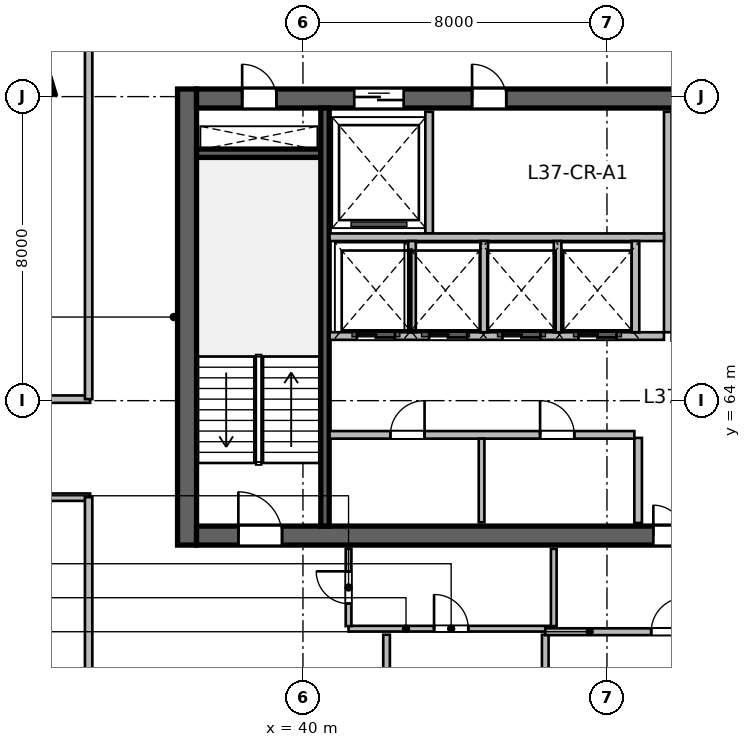
"""IFC4 building model, lengths in metres.
Left out: names, types, materials, properties, quantities, classifications, styles, units other than length and angle.
Written with IfcOpenShell. Run it as: python <this file> out.ifc"""

import sys

from ifc_helpers import new_model, si_unit, direction, frame, frame_2d, origin, origin_2d, place, context, subcontext, project, spatial, rectangle, extrude, source, transform, mapped, element, fill, save


model = new_model("IFC4")
c1 = context("Model", 3, precision=1e-05, world=origin(), true_north=direction((0.0, 1.0)))
c2 = subcontext(c1, "Body", "Model", "MODEL_VIEW")
j1 = project(units=[si_unit("LENGTHUNIT", "METRE"), si_unit("PLANEANGLEUNIT", "RADIAN")], contexts=[c1])
p1 = place(None, origin())
s1 = spatial("IfcSite", under=j1, at=p1, CompositionType="ELEMENT")
p2 = place(p1, origin())
s2 = spatial("IfcBuilding", under=s1, at=p2, CompositionType="ELEMENT")
p3 = place(p2, frame((0.0, 0.0, 154.5)))
s3 = spatial("IfcBuildingStorey", under=s2, at=p3, CompositionType="ELEMENT", Elevation=154.5)
m1 = source(origin(), c2, "Body", "SweptSolid", [
    extrude(rectangle(XDim=12.0, YDim=0.5, at=frame_2d((6.0, 0.0))), origin(), (0.0, 0.0, 1.0), 3.9),
])
p4 = place(p3, frame((36.95, 60.2, 0.0), z_axis=(0.0, 0.0, 1.0), x_axis=(0.0, 1.0, 0.0)))
e1 = element("IfcWall", 1, at=p4, inside=s3, PredefinedType="SHEAR", context=c2, shape_type="MappedRepresentation", body=[
    mapped(m1, transform((0.0, 0.0, 0.0), scale=1.0)),
])
m2 = source(origin(), c2, "Body", "SweptSolid", [
    extrude(rectangle(XDim=21.6, YDim=0.5, at=frame_2d((10.8, 0.0))), origin(), (0.0, 0.0, 1.0), 3.9),
])
p5 = place(p3, frame((37.2, 60.45, 0.0), z_axis=(0.0, 0.0, 1.0), x_axis=(1.0, 0.0, 0.0)))
e2 = element("IfcWall", 2, at=p5, inside=s3, PredefinedType="SHEAR", context=c2, shape_type="MappedRepresentation", body=[
    mapped(m2, transform((0.0, 0.0, 0.0), scale=1.0)),
])
p6 = place(p5, frame((1.1, 0.0, 0.0)))
e3 = element("IfcOpeningElement", 3, at=p6, cuts=e2, PredefinedType="OPENING", context=c2, shape_type="SweptSolid", body=[
    extrude(rectangle(XDim=1.15, YDim=2.15, at=frame_2d((0.575, 1.075))), frame((0.0, 0.26, 0.0), z_axis=(0.0, -1.0, 0.0), x_axis=(1.0, 0.0, 0.0)), (0.0, 0.0, 1.0), 0.52),
])
p7 = place(p5, frame((19.5, 0.0, 0.0)))
e4 = element("IfcOpeningElement", 4, at=p7, cuts=e2, PredefinedType="OPENING", context=c2, shape_type="SweptSolid", body=[
    extrude(rectangle(XDim=0.9, YDim=2.1, at=frame_2d((0.45, 1.05))), frame((0.0, 0.26, 0.0), z_axis=(0.0, -1.0, 0.0), x_axis=(1.0, 0.0, 0.0)), (0.0, 0.0, 1.0), 0.52),
])
p8 = place(p5, frame((12.02, 0.0, 0.0)))
e5 = element("IfcOpeningElement", 5, at=p8, cuts=e2, PredefinedType="OPENING", context=c2, shape_type="SweptSolid", body=[
    extrude(rectangle(XDim=1.6, YDim=2.15, at=frame_2d((0.8, 1.075))), frame((0.0, 0.26, 0.0), z_axis=(0.0, -1.0, 0.0), x_axis=(1.0, 0.0, 0.0)), (0.0, 0.0, 1.0), 0.52),
])
p9 = place(p3, frame((37.2, 71.95, 0.0), z_axis=(0.0, 0.0, 1.0), x_axis=(1.0, 0.0, 0.0)))
e6 = element("IfcWall", 6, at=p9, inside=s3, PredefinedType="SHEAR", context=c2, shape_type="MappedRepresentation", body=[
    mapped(m2, transform((0.0, 0.0, 0.0), scale=1.0)),
])
p10 = place(p9, frame((1.2, 0.0, 0.0)))
e7 = element("IfcOpeningElement", 7, at=p10, cuts=e6, PredefinedType="OPENING", context=c2, shape_type="SweptSolid", body=[
    extrude(rectangle(XDim=0.9, YDim=2.1, at=frame_2d((0.45, 1.05))), frame((0.0, 0.26, 0.0), z_axis=(0.0, -1.0, 0.0), x_axis=(1.0, 0.0, 0.0)), (0.0, 0.0, 1.0), 0.52),
])
p11 = place(p9, frame((14.7, 0.0, 0.0)))
e8 = element("IfcOpeningElement", 8, at=p11, cuts=e6, PredefinedType="OPENING", context=c2, shape_type="SweptSolid", body=[
    extrude(rectangle(XDim=1.2, YDim=2.15, at=frame_2d((0.6, 1.075))), frame((0.0, 0.26, 0.0), z_axis=(0.0, -1.0, 0.0), x_axis=(1.0, 0.0, 0.0)), (0.0, 0.0, 1.0), 0.52),
])
p12 = place(p9, frame((4.15, 0.0, 0.0)))
e9 = element("IfcOpeningElement", 9, at=p12, cuts=e6, PredefinedType="OPENING", context=c2, shape_type="SweptSolid", body=[
    extrude(rectangle(XDim=1.3, YDim=2.15, at=frame_2d((0.65, 1.075))), frame((0.0, 0.26, 0.0), z_axis=(0.0, -1.0, 0.0), x_axis=(1.0, 0.0, 0.0)), (0.0, 0.0, 1.0), 0.52),
])
p13 = place(p9, frame((7.25, 0.0, 0.0)))
e10 = element("IfcOpeningElement", 10, at=p13, cuts=e6, PredefinedType="OPENING", context=c2, shape_type="SweptSolid", body=[
    extrude(rectangle(XDim=0.9, YDim=2.1, at=frame_2d((0.45, 1.05))), frame((0.0, 0.26, 0.0), z_axis=(0.0, -1.0, 0.0), x_axis=(1.0, 0.0, 0.0)), (0.0, 0.0, 1.0), 0.52),
])
m3 = source(origin(), c2, "Body", "SweptSolid", [
    extrude(rectangle(XDim=3.27, YDim=0.22, at=frame_2d((1.635, 0.0))), origin(), (0.0, 0.0, 1.0), 3.9),
])
p14 = place(p3, frame((37.2, 70.51, 0.0), z_axis=(0.0, 0.0, 1.0), x_axis=(1.0, 0.0, 0.0)))
e11 = element("IfcWall", 11, at=p14, inside=s3, PredefinedType="SHEAR", context=c2, shape_type="MappedRepresentation", body=[
    mapped(m3, transform((0.0, 0.0, 0.0), scale=1.0)),
])
m4 = source(origin(), c2, "Body", "SweptSolid", [
    extrude(rectangle(XDim=11.0, YDim=0.22, at=frame_2d((5.5, 0.0))), origin(), (0.0, 0.0, 1.0), 3.9),
])
p15 = place(p3, frame((40.58, 60.7, 0.0), z_axis=(0.0, 0.0, 1.0), x_axis=(0.0, 1.0, 0.0)))
e12 = element("IfcWall", 12, at=p15, inside=s3, PredefinedType="SHEAR", context=c2, shape_type="MappedRepresentation", body=[
    mapped(m4, transform((0.0, 0.0, 0.0), scale=1.0)),
])
m5 = source(origin(), c2, "Body", "SweptSolid", [
    extrude(rectangle(XDim=1.1, YDim=1.1, at=origin_2d()), origin(), (0.0, 0.0, 1.0), 3.9),
])
p16 = place(p3, frame((32.791, 72.442, 0.0), z_axis=(0.0, 0.0, 1.0), x_axis=(-0.288697611798, 0.957420330337, 0.0)))
e13 = element("IfcColumn", 13, at=p16, inside=s3, PredefinedType="COLUMN", context=c2, shape_type="MappedRepresentation", body=[
    mapped(m5, transform((0.0, 0.0, 0.0), scale=1.0)),
])
m6 = source(origin(), c2, "Body", "SweptSolid", [
    extrude(rectangle(XDim=4.384, YDim=0.28, at=frame_2d((2.192, 0.0))), origin(), (0.0, 0.0, 1.0), 3.65),
])
p17 = place(p3, frame((31.702, 73.08, 0.0), z_axis=(0.0, 0.0, 1.0), x_axis=(0.895969968053, 0.444114643248, 0.0)))
e14 = element("IfcWall", 14, at=p17, inside=s3, PredefinedType="SOLIDWALL", context=c2, shape_type="MappedRepresentation", body=[
    mapped(m6, transform((0.0, 0.0, 0.0), scale=1.0)),
])
m7 = source(origin(), c2, "Body", "SweptSolid", [
    extrude(rectangle(XDim=2.24, YDim=0.2, at=frame_2d((1.12, 0.0))), origin(), (0.0, 0.0, 1.0), 3.65),
])
p18 = place(p3, frame((48.82, 60.78, 0.0), z_axis=(0.0, 0.0, 1.0), x_axis=(0.0, 1.0, 0.0)))
e15 = element("IfcWall", 15, at=p18, inside=s3, PredefinedType="SOLIDWALL", context=c2, shape_type="MappedRepresentation", body=[
    mapped(m7, transform((0.0, 0.0, 0.0), scale=1.0)),
])
m8 = source(origin(), c2, "Body", "SweptSolid", [
    extrude(rectangle(XDim=5.8, YDim=0.2, at=frame_2d((2.9, 0.0))), origin(), (0.0, 0.0, 1.0), 3.65),
])
p19 = place(p3, frame((49.6, 65.8, 0.0), z_axis=(0.0, 0.0, 1.0), x_axis=(0.0, 1.0, 0.0)))
e16 = element("IfcWall", 16, at=p19, inside=s3, PredefinedType="SOLIDWALL", context=c2, shape_type="MappedRepresentation", body=[
    mapped(m8, transform((0.0, 0.0, 0.0), scale=1.0)),
])
m9 = source(origin(), c2, "Body", "SweptSolid", [
    extrude(rectangle(XDim=3.2, YDim=0.2, at=frame_2d((1.6, 0.0))), origin(), (0.0, 0.0, 1.0), 3.65),
])
p20 = place(p3, frame((43.32, 68.4, 0.0), z_axis=(0.0, 0.0, 1.0), x_axis=(0.0, 1.0, 0.0)))
e17 = element("IfcWall", 17, at=p20, inside=s3, PredefinedType="SOLIDWALL", context=c2, shape_type="MappedRepresentation", body=[
    mapped(m9, transform((0.0, 0.0, 0.0), scale=1.0)),
])
m10 = source(origin(), c2, "Body", "SweptSolid", [
    extrude(rectangle(XDim=8.8, YDim=0.2, at=frame_2d((4.4, 0.0))), origin(), (0.0, 0.0, 1.0), 3.65),
])
p21 = place(p3, frame((40.7, 68.3, 0.0), z_axis=(0.0, 0.0, 1.0), x_axis=(1.0, 0.0, 0.0)))
e18 = element("IfcWall", 18, at=p21, inside=s3, PredefinedType="SOLIDWALL", context=c2, shape_type="MappedRepresentation", body=[
    mapped(m10, transform((0.0, 0.0, 0.0), scale=1.0)),
])
m11 = source(origin(), c2, "Body", "SweptSolid", [
    extrude(rectangle(XDim=8.02, YDim=0.2, at=frame_2d((4.01, 0.0))), origin(), (0.0, 0.0, 1.0), 3.65),
])
p22 = place(p3, frame((40.7, 63.1, 0.0), z_axis=(0.0, 0.0, 1.0), x_axis=(1.0, 0.0, 0.0)))
e19 = element("IfcWall", 19, at=p22, inside=s3, PredefinedType="SOLIDWALL", context=c2, shape_type="MappedRepresentation", body=[
    mapped(m11, transform((0.0, 0.0, 0.0), scale=1.0)),
])
p23 = place(p22, frame((1.6, 0.0, 0.0)))
e20 = element("IfcOpeningElement", 20, at=p23, cuts=e19, PredefinedType="OPENING", context=c2, shape_type="SweptSolid", body=[
    extrude(rectangle(XDim=0.9, YDim=2.1, at=frame_2d((0.45, 1.05))), frame((0.0, 0.11, 0.0), z_axis=(0.0, -1.0, 0.0), x_axis=(1.0, 0.0, 0.0)), (0.0, 0.0, 1.0), 0.22),
])
p24 = place(p22, frame((5.54, 0.0, 0.0)))
e21 = element("IfcOpeningElement", 21, at=p24, cuts=e19, PredefinedType="OPENING", context=c2, shape_type="SweptSolid", body=[
    extrude(rectangle(XDim=0.9, YDim=2.1, at=frame_2d((0.45, 1.05))), frame((0.0, 0.11, 0.0), z_axis=(0.0, -1.0, 0.0), x_axis=(1.0, 0.0, 0.0)), (0.0, 0.0, 1.0), 0.22),
])
m12 = source(origin(), c2, "Body", "SweptSolid", [
    extrude(rectangle(XDim=2.2, YDim=0.15, at=frame_2d((1.1, 0.0))), origin(), (0.0, 0.0, 1.0), 3.65),
])
p25 = place(p3, frame((44.7, 60.8, 0.0), z_axis=(0.0, 0.0, 1.0), x_axis=(0.0, 1.0, 0.0)))
e22 = element("IfcWall", 22, at=p25, inside=s3, PredefinedType="PARTITIONING", context=c2, shape_type="MappedRepresentation", body=[
    mapped(m12, transform((0.0, 0.0, 0.0), scale=1.0)),
])
p26 = place(p3, frame((40.7, 65.7, 0.0), z_axis=(0.0, 0.0, 1.0), x_axis=(1.0, 0.0, 0.0)))
e23 = element("IfcWall", 23, at=p26, inside=s3, PredefinedType="SOLIDWALL", context=c2, shape_type="MappedRepresentation", body=[
    mapped(m10, transform((0.0, 0.0, 0.0), scale=1.0)),
])
p27 = place(p26, frame((0.72, 0.0, 0.0)))
e24 = element("IfcOpeningElement", 24, at=p27, cuts=e23, PredefinedType="OPENING", context=c2, shape_type="SweptSolid", body=[
    extrude(rectangle(XDim=1.0, YDim=2.15, at=frame_2d((0.5, 1.075))), frame((0.0, 0.11, 0.0), z_axis=(0.0, -1.0, 0.0), x_axis=(1.0, 0.0, 0.0)), (0.0, 0.0, 1.0), 0.22),
])
p28 = place(p26, frame((2.62, 0.0, 0.0)))
e25 = element("IfcOpeningElement", 25, at=p28, cuts=e23, PredefinedType="OPENING", context=c2, shape_type="SweptSolid", body=[
    extrude(rectangle(XDim=1.0, YDim=2.15, at=frame_2d((0.5, 1.075))), frame((0.0, 0.11, 0.0), z_axis=(0.0, -1.0, 0.0), x_axis=(1.0, 0.0, 0.0)), (0.0, 0.0, 1.0), 0.22),
])
p29 = place(p26, frame((4.55, 0.0, 0.0)))
e26 = element("IfcOpeningElement", 26, at=p29, cuts=e23, PredefinedType="OPENING", context=c2, shape_type="SweptSolid", body=[
    extrude(rectangle(XDim=1.0, YDim=2.15, at=frame_2d((0.5, 1.075))), frame((0.0, 0.11, 0.0), z_axis=(0.0, -1.0, 0.0), x_axis=(1.0, 0.0, 0.0)), (0.0, 0.0, 1.0), 0.22),
])
p30 = place(p26, frame((6.55, 0.0, 0.0)))
e27 = element("IfcOpeningElement", 27, at=p30, cuts=e23, PredefinedType="OPENING", context=c2, shape_type="SweptSolid", body=[
    extrude(rectangle(XDim=1.0, YDim=2.15, at=frame_2d((0.5, 1.075))), frame((0.0, 0.11, 0.0), z_axis=(0.0, -1.0, 0.0), x_axis=(1.0, 0.0, 0.0)), (0.0, 0.0, 1.0), 0.22),
])
m13 = source(origin(), c2, "Body", "SweptSolid", [
    extrude(rectangle(XDim=2.4, YDim=0.2, at=frame_2d((1.2, 0.0))), origin(), (0.0, 0.0, 1.0), 3.65),
])
for number, where, z_axis, x_axis in (
    (28, (48.75, 65.8, 0.0), (0.0, 0.0, 1.0), (0.0, 1.0, 0.0)),
    (29, (42.87, 65.8, 0.0), (0.0, 0.0, 1.0), (0.0, 1.0, 0.0)),
    (30, (44.77, 65.8, 0.0), (0.0, 0.0, 1.0), (0.0, 1.0, 0.0)),
    (31, (46.7, 65.8, 0.0), (0.0, 0.0, 1.0), (0.0, 1.0, 0.0)),
):
    element("IfcWall", number, at=place(p3, frame(where, z_axis=z_axis, x_axis=x_axis)), inside=s3, PredefinedType="SOLIDWALL", context=c2, shape_type="MappedRepresentation", body=[
        mapped(m13, transform((0.0, 0.0, 0.0), scale=1.0)),
    ])
m14 = source(origin(), c2, "Body", "SweptSolid", [
    extrude(rectangle(XDim=5.4, YDim=0.15, at=frame_2d((2.7, 0.0))), origin(), (0.0, 0.0, 1.0), 3.65),
])
p31 = place(p3, frame((41.2, 58.0, 0.0), z_axis=(0.0, 0.0, 1.0), x_axis=(1.0, 0.0, 0.0)))
e32 = element("IfcWall", 32, at=p31, inside=s3, PredefinedType="PARTITIONING", context=c2, shape_type="MappedRepresentation", body=[
    mapped(m14, transform((0.0, 0.0, 0.0), scale=1.0)),
])
p32 = place(p31, frame((2.25, 0.0, 0.0)))
e33 = element("IfcOpeningElement", 33, at=p32, cuts=e32, PredefinedType="OPENING", context=c2, shape_type="SweptSolid", body=[
    extrude(rectangle(XDim=0.9, YDim=2.08, at=frame_2d((0.45, 1.04))), frame((0.0, 0.085, 0.0), z_axis=(0.0, -1.0, 0.0), x_axis=(1.0, 0.0, 0.0)), (0.0, 0.0, 1.0), 0.17),
])
m15 = source(origin(), c2, "Body", "SweptSolid", [
    extrude(rectangle(XDim=2.033, YDim=0.15, at=frame_2d((1.016, 0.0))), origin(), (0.0, 0.0, 1.0), 3.65),
])
p33 = place(p3, frame((41.2, 58.067, 0.0), z_axis=(0.0, 0.0, 1.0), x_axis=(0.0, 1.0, 0.0)))
e34 = element("IfcWall", 34, at=p33, inside=s3, PredefinedType="PARTITIONING", context=c2, shape_type="MappedRepresentation", body=[
    mapped(m15, transform((0.0, 0.0, 0.0), scale=1.0)),
])
p34 = place(p33, frame((0.591, 0.0, 0.0)))
e35 = element("IfcOpeningElement", 35, at=p34, cuts=e34, PredefinedType="OPENING", context=c2, shape_type="SweptSolid", body=[
    extrude(rectangle(XDim=0.85, YDim=2.1, at=frame_2d((0.425, 1.05))), frame((0.0, 0.085, 0.0), z_axis=(0.0, -1.0, 0.0), x_axis=(1.0, 0.0, 0.0)), (0.0, 0.0, 1.0), 0.17),
])
p35 = place(p3, frame((46.6, 58.067, 0.0), z_axis=(0.0, 0.0, 1.0), x_axis=(0.0, 1.0, 0.0)))
e36 = element("IfcWall", 36, at=p35, inside=s3, PredefinedType="PARTITIONING", context=c2, shape_type="MappedRepresentation", body=[
    mapped(m15, transform((0.0, 0.0, 0.0), scale=1.0)),
])
m16 = source(origin(), c2, "Body", "SweptSolid", [
    extrude(rectangle(XDim=3.763, YDim=0.175, at=frame_2d((1.881, 0.0))), origin(), (0.0, 0.0, 1.0), 3.65),
])
p36 = place(p3, frame((42.2, 54.079, 0.0), z_axis=(0.0, 0.0, 1.0), x_axis=(0.0, 1.0, 0.0)))
e37 = element("IfcWall", 37, at=p36, inside=s3, PredefinedType="PARTITIONING", context=c2, shape_type="MappedRepresentation", body=[
    mapped(m16, transform((0.0, 0.0, 0.0), scale=1.0)),
])
m17 = source(origin(), c2, "Body", "SweptSolid", [
    extrude(rectangle(XDim=3.065, YDim=0.175, at=frame_2d((1.533, 0.0))), origin(), (0.0, 0.0, 1.0), 3.65),
])
p37 = place(p3, frame((46.376, 54.776, 0.0), z_axis=(0.0, 0.0, 1.0), x_axis=(0.0, 1.0, 0.0)))
e38 = element("IfcWall", 38, at=p37, inside=s3, PredefinedType="PARTITIONING", context=c2, shape_type="MappedRepresentation", body=[
    mapped(m17, transform((0.0, 0.0, 0.0), scale=1.0)),
])
m18 = source(origin(), c2, "Body", "SweptSolid", [
    extrude(rectangle(XDim=4.176, YDim=0.18, at=frame_2d((2.088, 0.0))), origin(), (0.0, 0.0, 1.0), 3.65),
])
p38 = place(p3, frame((46.376, 57.92, 0.0), z_axis=(0.0, 0.0, 1.0), x_axis=(1.0, 0.0, 0.0)))
e39 = element("IfcWall", 39, at=p38, inside=s3, PredefinedType="PLUMBINGWALL", context=c2, shape_type="MappedRepresentation", body=[
    mapped(m18, transform((0.0, 0.0, 0.0), scale=1.0)),
])
p39 = place(p38, frame((2.788, 0.0, 0.0)))
e40 = element("IfcOpeningElement", 40, at=p39, cuts=e39, PredefinedType="OPENING", context=c2, shape_type="SweptSolid", body=[
    extrude(rectangle(XDim=0.9, YDim=2.08, at=frame_2d((0.45, 1.04))), frame((0.0, 0.1, 0.0), z_axis=(0.0, -1.0, 0.0), x_axis=(1.0, 0.0, 0.0)), (0.0, 0.0, 1.0), 0.2),
])
m19 = source(origin(), c2, "Body", "SweptSolid", [
    extrude(rectangle(XDim=11.22, YDim=0.195, at=frame_2d((5.61, 0.0))), origin(), (0.0, 0.0, 1.0), 3.65),
])
p40 = place(p3, frame((23.18, 64.04, 0.0), z_axis=(0.0, 0.0, 1.0), x_axis=(1.0, 0.0, 0.0)))
e41 = element("IfcWall", 41, at=p40, inside=s3, PredefinedType="PARTITIONING", context=c2, shape_type="MappedRepresentation", body=[
    mapped(m19, transform((0.0, 0.0, 0.0), scale=1.0)),
])
p41 = place(p40, frame((5.135, 0.0, 0.0)))
e42 = element("IfcOpeningElement", 42, at=p41, cuts=e41, PredefinedType="OPENING", context=c2, shape_type="SweptSolid", body=[
    extrude(rectangle(XDim=0.95, YDim=2.1, at=frame_2d((0.475, 1.05))), frame((0.0, 0.107, 0.0), z_axis=(0.0, -1.0, 0.0), x_axis=(1.0, 0.0, 0.0)), (0.0, 0.0, 1.0), 0.215),
])
p42 = place(p3, frame((23.18, 61.46, 0.0), z_axis=(0.0, 0.0, 1.0), x_axis=(1.0, 0.0, 0.0)))
e43 = element("IfcWall", 43, at=p42, inside=s3, PredefinedType="PARTITIONING", context=c2, shape_type="MappedRepresentation", body=[
    mapped(m19, transform((0.0, 0.0, 0.0), scale=1.0)),
])
p43 = place(p42, frame((5.135, 0.0, 0.0)))
e44 = element("IfcOpeningElement", 44, at=p43, cuts=e43, PredefinedType="OPENING", context=c2, shape_type="SweptSolid", body=[
    extrude(rectangle(XDim=0.95, YDim=2.1, at=frame_2d((0.475, 1.05))), frame((0.0, 0.107, 0.0), z_axis=(0.0, -1.0, 0.0), x_axis=(1.0, 0.0, 0.0)), (0.0, 0.0, 1.0), 0.215),
])
m20 = source(origin(), c2, "Body", "SweptSolid", [
    extrude(rectangle(XDim=12.126, YDim=0.195, at=frame_2d((6.063, 0.0))), origin(), (0.0, 0.0, 1.0), 3.65),
])
p44 = place(p3, frame((34.36, 49.334, 0.0), z_axis=(0.0, 0.0, 1.0), x_axis=(0.0, 1.0, 0.0)))
e45 = element("IfcWall", 45, at=p44, inside=s3, PredefinedType="PARTITIONING", context=c2, shape_type="MappedRepresentation", body=[
    mapped(m20, transform((0.0, 0.0, 0.0), scale=1.0)),
])
m21 = source(origin(), c2, "Body", "SweptSolid", [
    extrude(rectangle(XDim=10.346, YDim=0.195, at=frame_2d((5.173, 0.0))), origin(), (0.0, 0.0, 1.0), 3.65),
])
p45 = place(p3, frame((34.36, 64.04, 0.0), z_axis=(0.0, 0.0, 1.0), x_axis=(0.0, 1.0, 0.0)))
e46 = element("IfcWall", 46, at=p45, inside=s3, PredefinedType="PARTITIONING", context=c2, shape_type="MappedRepresentation", body=[
    mapped(m21, transform((0.0, 0.0, 0.0), scale=1.0)),
])
m22 = source(origin(), c2, "Body", "SweptSolid", [
    extrude(rectangle(XDim=1.15, YDim=2.15, at=frame_2d((0.575, 1.075))), frame((0.0, 0.025, 0.0), z_axis=(0.0, -1.0, 0.0), x_axis=(1.0, 0.0, 0.0)), (0.0, 0.0, 1.0), 0.05),
])
p46 = place(p6, origin())
e47 = element("IfcDoor", 47, at=p46, inside=s3, OperationType="SINGLE_SWING_LEFT", PredefinedType="DOOR", context=c2, shape_type="MappedRepresentation", body=[
    mapped(m22, transform((0.0, 0.0, 0.0), scale=1.0)),
])
fill(e3, e47)
m23 = source(origin(), c2, "Body", "SweptSolid", [
    extrude(rectangle(XDim=0.9, YDim=2.1, at=frame_2d((0.45, 1.05))), frame((0.0, 0.025, 0.0), z_axis=(0.0, -1.0, 0.0), x_axis=(1.0, 0.0, 0.0)), (0.0, 0.0, 1.0), 0.05),
])
p47 = place(p10, origin())
e48 = element("IfcDoor", 48, at=p47, inside=s3, OperationType="SINGLE_SWING_LEFT", PredefinedType="DOOR", context=c2, shape_type="MappedRepresentation", body=[
    mapped(m23, transform((0.0, 0.0, 0.0), scale=1.0)),
])
fill(e7, e48)
m24 = source(origin(), c2, "Body", "SweptSolid", [
    extrude(rectangle(XDim=1.6, YDim=2.15, at=frame_2d((0.8, 1.075))), frame((0.0, 0.025, 0.0), z_axis=(0.0, -1.0, 0.0), x_axis=(1.0, 0.0, 0.0)), (0.0, 0.0, 1.0), 0.05),
])
p48 = place(p8, origin())
e49 = element("IfcDoor", 49, at=p48, inside=s3, OperationType="DOUBLE_DOOR_SINGLE_SWING", PredefinedType="DOOR", context=c2, shape_type="MappedRepresentation", body=[
    mapped(m24, transform((0.0, 0.0, 0.0), scale=1.0)),
])
fill(e5, e49)
m25 = source(origin(), c2, "Body", "SweptSolid", [
    extrude(rectangle(XDim=1.3, YDim=2.15, at=frame_2d((0.65, 1.075))), frame((0.0, 0.025, 0.0), z_axis=(0.0, -1.0, 0.0), x_axis=(1.0, 0.0, 0.0)), (0.0, 0.0, 1.0), 0.05),
])
p49 = place(p12, origin())
e50 = element("IfcDoor", 50, at=p49, inside=s3, OperationType="DOUBLE_DOOR_SLIDING", PredefinedType="DOOR", context=c2, shape_type="MappedRepresentation", body=[
    mapped(m25, transform((0.0, 0.0, 0.0), scale=1.0)),
])
fill(e9, e50)
p50 = place(p13, origin())
e51 = element("IfcDoor", 51, at=p50, inside=s3, OperationType="SINGLE_SWING_LEFT", PredefinedType="DOOR", context=c2, shape_type="MappedRepresentation", body=[
    mapped(m23, transform((0.0, 0.0, 0.0), scale=1.0)),
])
fill(e10, e51)
p51 = place(p23, origin())
e52 = element("IfcDoor", 52, at=p51, inside=s3, OperationType="SINGLE_SWING_RIGHT", PredefinedType="DOOR", context=c2, shape_type="MappedRepresentation", body=[
    mapped(m23, transform((0.0, 0.0, 0.0), scale=1.0)),
])
fill(e20, e52)
p52 = place(p24, origin())
e53 = element("IfcDoor", 53, at=p52, inside=s3, OperationType="SINGLE_SWING_LEFT", PredefinedType="DOOR", context=c2, shape_type="MappedRepresentation", body=[
    mapped(m23, transform((0.0, 0.0, 0.0), scale=1.0)),
])
fill(e21, e53)
m26 = source(origin(), c2, "Body", "SweptSolid", [
    extrude(rectangle(XDim=1.0, YDim=2.15, at=frame_2d((0.5, 1.075))), frame((0.0, 0.025, 0.0), z_axis=(0.0, -1.0, 0.0), x_axis=(1.0, 0.0, 0.0)), (0.0, 0.0, 1.0), 0.05),
])
p53 = place(p27, origin())
e54 = element("IfcDoor", 54, at=p53, inside=s3, OperationType="DOUBLE_DOOR_SLIDING", PredefinedType="DOOR", context=c2, shape_type="MappedRepresentation", body=[
    mapped(m26, transform((0.0, 0.0, 0.0), scale=1.0)),
])
fill(e24, e54)
p54 = place(p28, origin())
e55 = element("IfcDoor", 55, at=p54, inside=s3, OperationType="DOUBLE_DOOR_SLIDING", PredefinedType="DOOR", context=c2, shape_type="MappedRepresentation", body=[
    mapped(m26, transform((0.0, 0.0, 0.0), scale=1.0)),
])
fill(e25, e55)
p55 = place(p29, origin())
e56 = element("IfcDoor", 56, at=p55, inside=s3, OperationType="DOUBLE_DOOR_SLIDING", PredefinedType="DOOR", context=c2, shape_type="MappedRepresentation", body=[
    mapped(m26, transform((0.0, 0.0, 0.0), scale=1.0)),
])
fill(e26, e56)
p56 = place(p30, origin())
e57 = element("IfcDoor", 57, at=p56, inside=s3, OperationType="DOUBLE_DOOR_SLIDING", PredefinedType="DOOR", context=c2, shape_type="MappedRepresentation", body=[
    mapped(m26, transform((0.0, 0.0, 0.0), scale=1.0)),
])
fill(e27, e57)
m27 = source(origin(), c2, "Body", "SweptSolid", [
    extrude(rectangle(XDim=0.85, YDim=2.1, at=frame_2d((0.425, 1.05))), frame((0.0, 0.025, 0.0), z_axis=(0.0, -1.0, 0.0), x_axis=(1.0, 0.0, 0.0)), (0.0, 0.0, 1.0), 0.05),
])
p57 = place(p34, origin())
e58 = element("IfcDoor", 58, at=p57, inside=s3, OperationType="SINGLE_SWING_RIGHT", PredefinedType="DOOR", context=c2, shape_type="MappedRepresentation", body=[
    mapped(m27, transform((0.0, 0.0, 0.0), scale=1.0)),
])
fill(e35, e58)
m28 = source(origin(), c2, "Body", "SweptSolid", [
    extrude(rectangle(XDim=0.9, YDim=2.08, at=frame_2d((0.45, 1.04))), frame((0.0, 0.025, 0.0), z_axis=(0.0, -1.0, 0.0), x_axis=(1.0, 0.0, 0.0)), (0.0, 0.0, 1.0), 0.05),
])
p58 = place(p32, origin())
e59 = element("IfcDoor", 59, at=p58, inside=s3, OperationType="SINGLE_SWING_LEFT", PredefinedType="DOOR", context=c2, shape_type="MappedRepresentation", body=[
    mapped(m28, transform((0.0, 0.0, 0.0), scale=1.0)),
])
fill(e33, e59)
p59 = place(p39, origin())
e60 = element("IfcDoor", 60, at=p59, inside=s3, OperationType="SINGLE_SWING_RIGHT", PredefinedType="DOOR", context=c2, shape_type="MappedRepresentation", body=[
    mapped(m28, transform((0.0, 0.0, 0.0), scale=1.0)),
])
fill(e40, e60)
save(model, sys.argv[1])
